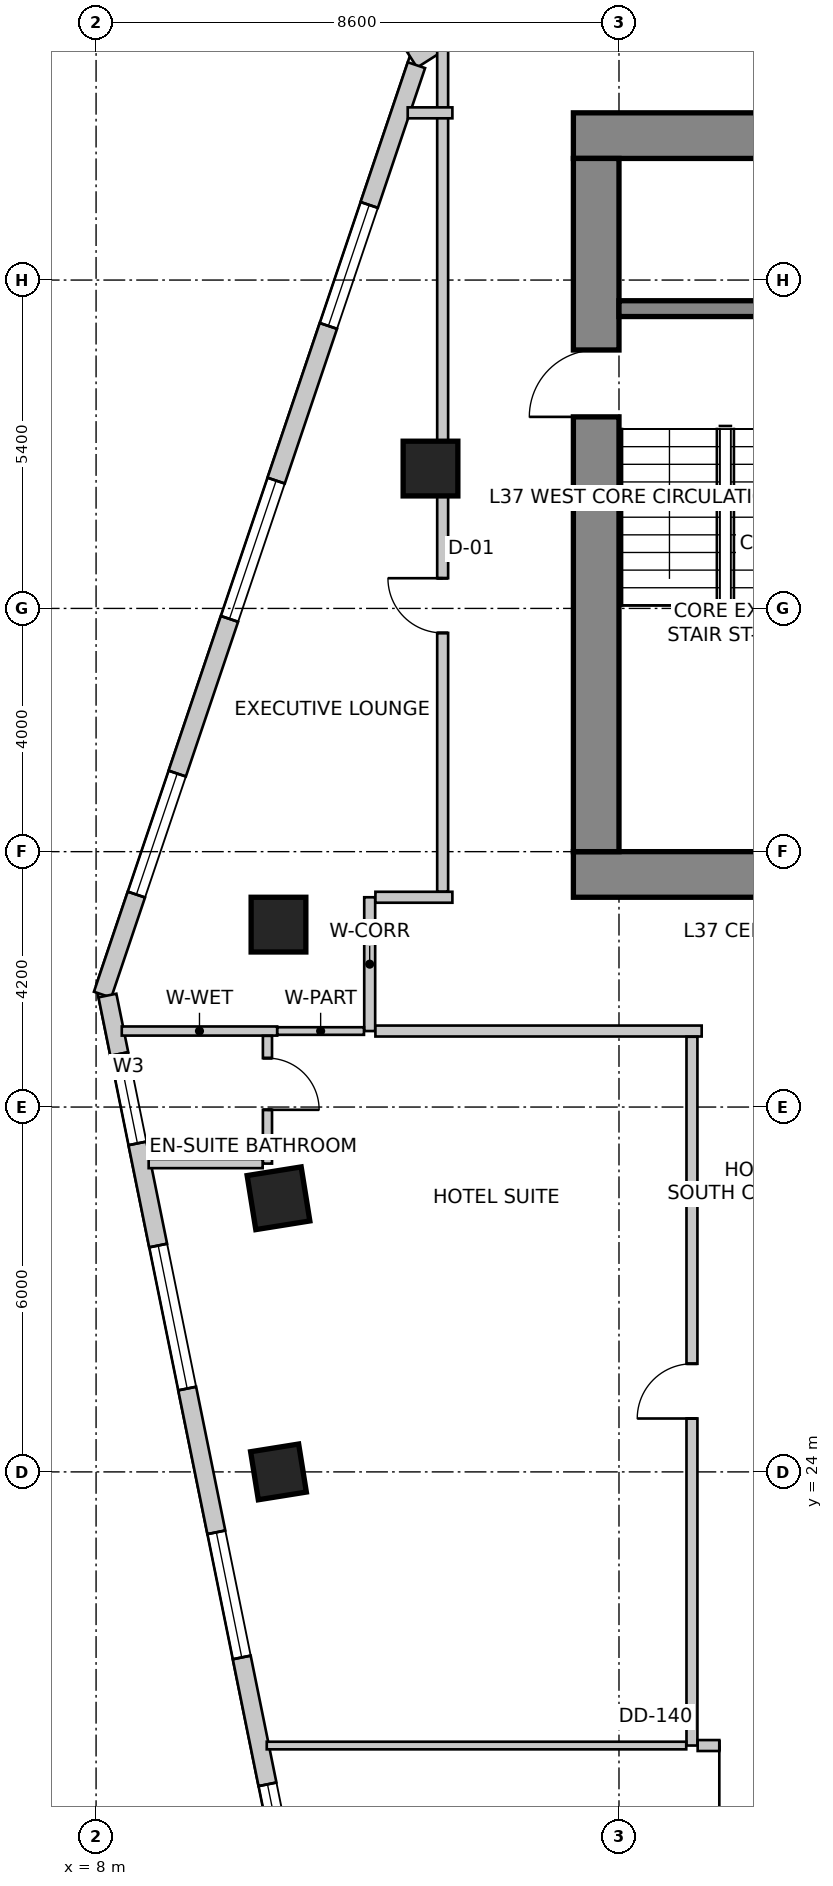
"""IFC4 building model, lengths in metres.
Left out: names, types, materials, properties, quantities, classifications, styles, units other than length and angle.
Written with IfcOpenShell. Run it as: python <this file> out.ifc"""

import sys

from ifc_helpers import new_model, si_unit, direction, frame, frame_2d, origin, origin_2d, place, context, subcontext, project, spatial, rectangle, extrude, source, transform, mapped, element, fill, save


model = new_model("IFC4")
c1 = context("Model", 3, precision=1e-05, world=origin(), true_north=direction((0.0, 1.0)))
c2 = subcontext(c1, "Body", "Model", "MODEL_VIEW")
j1 = project(units=[si_unit("LENGTHUNIT", "METRE"), si_unit("PLANEANGLEUNIT", "RADIAN")], contexts=[c1])
p1 = place(None, origin())
s1 = spatial("IfcSite", under=j1, at=p1, CompositionType="ELEMENT")
p2 = place(p1, origin())
s2 = spatial("IfcBuilding", under=s1, at=p2, CompositionType="ELEMENT")
p3 = place(p2, frame((0.0, 0.0, 150.2)))
s3 = spatial("IfcBuildingStorey", under=s2, at=p3, CompositionType="ELEMENT", Elevation=150.2)
p4 = place(p3, frame((15.85, 45.975, 0.0), z_axis=(0.0, 0.0, 1.0), x_axis=(1.0, 0.0, 0.0)))
e1 = element("IfcWall", 1, at=p4, inside=s3, PredefinedType="SHEAR", context=c2, shape_type="SweptSolid", body=[
    extrude(rectangle(XDim=15.9, YDim=0.75, at=frame_2d((7.95, 0.0))), origin(), (0.0, 0.0, 1.0), 3.6),
])
p5 = place(p3, frame((15.85, 33.825, 0.0), z_axis=(0.0, 0.0, 1.0), x_axis=(1.0, 0.0, 0.0)))
e2 = element("IfcWall", 2, at=p5, inside=s3, PredefinedType="SHEAR", context=c2, shape_type="SweptSolid", body=[
    extrude(rectangle(XDim=15.9, YDim=0.75, at=frame_2d((7.95, 0.0))), origin(), (0.0, 0.0, 1.0), 3.6),
])
m1 = source(origin(), c2, "Body", "SweptSolid", [
    extrude(rectangle(XDim=1.3, YDim=2.15, at=frame_2d((0.65, 1.075))), frame((0.0, 0.385, 0.0), z_axis=(0.0, -1.0, 0.0), x_axis=(1.0, 0.0, 0.0)), (0.0, 0.0, 1.0), 0.77),
])
p6 = place(p5, frame((10.08, 0.0, 0.0)))
e3 = element("IfcOpeningElement", 3, at=p6, cuts=e2, PredefinedType="OPENING", context=c2, shape_type="MappedRepresentation", body=[
    mapped(m1, transform((0.0, 0.0, 0.0), scale=1.0)),
])
p7 = place(p3, frame((16.225, 34.2, 0.0), z_axis=(0.0, 0.0, 1.0), x_axis=(0.0, 1.0, 0.0)))
e4 = element("IfcWall", 4, at=p7, inside=s3, PredefinedType="SHEAR", context=c2, shape_type="SweptSolid", body=[
    extrude(rectangle(XDim=11.4, YDim=0.75, at=frame_2d((5.7, 0.0))), origin(), (0.0, 0.0, 1.0), 3.6),
])
m2 = source(origin(), c2, "Body", "SweptSolid", [
    extrude(rectangle(XDim=1.1, YDim=2.15, at=frame_2d((0.55, 1.075))), frame((0.0, 0.385, 0.0), z_axis=(0.0, -1.0, 0.0), x_axis=(1.0, 0.0, 0.0)), (0.0, 0.0, 1.0), 0.77),
])
p8 = place(p7, frame((7.15, 0.0, 0.0)))
e5 = element("IfcOpeningElement", 5, at=p8, cuts=e4, PredefinedType="OPENING", context=c2, shape_type="MappedRepresentation", body=[
    mapped(m2, transform((0.0, 0.0, 0.0), scale=1.0)),
])
p9 = place(p3, frame((16.6, 43.13, 0.0), z_axis=(0.0, 0.0, 1.0), x_axis=(1.0, 0.0, 0.0)))
e6 = element("IfcWall", 6, at=p9, inside=s3, PredefinedType="SHEAR", context=c2, shape_type="SweptSolid", body=[
    extrude(rectangle(XDim=3.5, YDim=0.26, at=frame_2d((1.75, 0.0))), origin(), (0.0, 0.0, 1.0), 3.6),
])
m3 = source(origin(), c2, "Body", "SweptSolid", [
    extrude(rectangle(XDim=0.9, YDim=0.9, at=origin_2d()), origin(), (0.0, 0.0, 1.0), 3.6),
])
for number, where, z_axis, x_axis in (
    (7, (11.0, 33.0, 0.0), (0.0, 0.0, 1.0), (1.0, 0.0, 0.0)),
    (8, (13.5, 40.5, 0.0), (0.0, 0.0, 1.0), (1.0, 0.0, 0.0)),
    (9, (11.0, 28.5, 0.0), (0.0, 0.0, 1.0), (0.158, -0.987, 0.0)),
):
    element("IfcColumn", number, at=place(p3, frame(where, z_axis=z_axis, x_axis=x_axis)), inside=s3, PredefinedType="COLUMN", context=c2, shape_type="MappedRepresentation", body=[
        mapped(m3, transform((0.0, 0.0, 0.0), scale=1.0)),
    ])
m4 = source(origin(), c2, "Body", "SweptSolid", [
    extrude(rectangle(XDim=0.8, YDim=0.8, at=origin_2d()), origin(), (0.0, 0.0, 1.0), 3.6),
])
p10 = place(p3, frame((11.0, 24.0, 0.0), z_axis=(0.0, 0.0, 1.0), x_axis=(0.158158067254, -0.987413806751, 0.0)))
e10 = element("IfcColumn", 10, at=p10, inside=s3, PredefinedType="COLUMN", context=c2, shape_type="MappedRepresentation", body=[
    mapped(m4, transform((0.0, 0.0, 0.0), scale=1.0)),
])
p11 = place(p3, frame((21.875, 52.742, 0.0), z_axis=(0.0, 0.0, 1.0), x_axis=(-0.843662465249, -0.536873956092, 0.0)))
e11 = element("IfcWall", 11, at=p11, inside=s3, PredefinedType="SOLIDWALL", context=c2, shape_type="SweptSolid", body=[
    extrude(rectangle(XDim=10.284, YDim=0.3, at=frame_2d((5.142, 0.0))), origin(), (0.0, 0.0, 1.0), 3.35),
])
m5 = source(origin(), c2, "Body", "SweptSolid", [
    extrude(rectangle(XDim=2.4, YDim=2.2, at=frame_2d((1.2, 1.1))), frame((0.0, 0.16, 0.0), z_axis=(0.0, -1.0, 0.0), x_axis=(1.0, 0.0, 0.0)), (0.0, 0.0, 1.0), 0.32),
])
p12 = place(p11, frame((2.656, 0.0, 0.85)))
e12 = element("IfcOpeningElement", 12, at=p12, cuts=e11, PredefinedType="OPENING", context=c2, shape_type="MappedRepresentation", body=[
    mapped(m5, transform((0.0, 0.0, 0.0), scale=1.0)),
])
m6 = source(origin(), c2, "Body", "SweptSolid", [
    extrude(rectangle(XDim=1.5, YDim=1.8, at=frame_2d((0.75, 0.9))), frame((0.0, 0.16, 0.0), z_axis=(0.0, -1.0, 0.0), x_axis=(1.0, 0.0, 0.0)), (0.0, 0.0, 1.0), 0.32),
])
p13 = place(p11, frame((7.937, 0.0, 0.85)))
e13 = element("IfcOpeningElement", 13, at=p13, cuts=e11, PredefinedType="OPENING", context=c2, shape_type="MappedRepresentation", body=[
    mapped(m6, transform((0.0, 0.0, 0.0), scale=1.0)),
])
p14 = place(p3, frame((13.269, 47.134, 0.0), z_axis=(0.0, 0.0, 1.0), x_axis=(-0.319929773322, -0.947441259468, 0.0)))
e14 = element("IfcWall", 14, at=p14, inside=s3, PredefinedType="SOLIDWALL", context=c2, shape_type="SweptSolid", body=[
    extrude(rectangle(XDim=16.134, YDim=0.3, at=frame_2d((8.067, 0.0))), origin(), (0.0, 0.0, 1.0), 3.35),
])
m7 = source(origin(), c2, "Body", "SweptSolid", [
    extrude(rectangle(XDim=2.1, YDim=2.0, at=frame_2d((1.05, 1.0))), frame((0.0, 0.16, 0.0), z_axis=(0.0, -1.0, 0.0), x_axis=(1.0, 0.0, 0.0)), (0.0, 0.0, 1.0), 0.32),
])
p15 = place(p14, frame((2.426, 0.0, 0.85)))
e15 = element("IfcOpeningElement", 15, at=p15, cuts=e14, PredefinedType="OPENING", context=c2, shape_type="MappedRepresentation", body=[
    mapped(m7, transform((0.0, 0.0, 0.0), scale=1.0)),
])
p16 = place(p14, frame((7.211, 0.0, 0.85)))
e16 = element("IfcOpeningElement", 16, at=p16, cuts=e14, PredefinedType="OPENING", context=c2, shape_type="MappedRepresentation", body=[
    mapped(m5, transform((0.0, 0.0, 0.0), scale=1.0)),
])
p17 = place(p14, frame((12.296, 0.0, 0.85)))
e17 = element("IfcOpeningElement", 17, at=p17, cuts=e14, PredefinedType="OPENING", context=c2, shape_type="MappedRepresentation", body=[
    mapped(m7, transform((0.0, 0.0, 0.0), scale=1.0)),
])
p18 = place(p3, frame((8.187, 31.834, 0.0), z_axis=(0.0, 0.0, 1.0), x_axis=(0.198869838988, -0.980025911464, 0.0)))
e18 = element("IfcWall", 18, at=p18, inside=s3, PredefinedType="SOLIDWALL", context=c2, shape_type="SweptSolid", body=[
    extrude(rectangle(XDim=16.363, YDim=0.3, at=frame_2d((8.182, 0.0))), origin(), (0.0, 0.0, 1.0), 3.35),
])
p19 = place(p18, frame((0.981, 0.0, 0.85)))
e19 = element("IfcOpeningElement", 19, at=p19, cuts=e18, PredefinedType="OPENING", context=c2, shape_type="MappedRepresentation", body=[
    mapped(m6, transform((0.0, 0.0, 0.0), scale=1.0)),
])
p20 = place(p18, frame((4.195, 0.0, 0.85)))
e20 = element("IfcOpeningElement", 20, at=p20, cuts=e18, PredefinedType="OPENING", context=c2, shape_type="MappedRepresentation", body=[
    mapped(m5, transform((0.0, 0.0, 0.0), scale=1.0)),
])
p21 = place(p18, frame((9.007, 0.0, 0.85)))
e21 = element("IfcOpeningElement", 21, at=p21, cuts=e18, PredefinedType="OPENING", context=c2, shape_type="MappedRepresentation", body=[
    mapped(m7, transform((0.0, 0.0, 0.0), scale=1.0)),
])
p22 = place(p18, frame((13.236, 0.0, 0.85)))
e22 = element("IfcOpeningElement", 22, at=p22, cuts=e18, PredefinedType="OPENING", context=c2, shape_type="MappedRepresentation", body=[
    mapped(m5, transform((0.0, 0.0, 0.0), scale=1.0)),
])
p23 = place(p3, frame((12.5, 31.25, 0.0), z_axis=(0.0, 0.0, 1.0), x_axis=(0.0, 1.0, 0.0)))
e23 = element("IfcWall", 23, at=p23, inside=s3, PredefinedType="PARTITIONING", context=c2, shape_type="SweptSolid", body=[
    extrude(rectangle(XDim=2.2, YDim=0.18, at=frame_2d((1.1, 0.0))), origin(), (0.0, 0.0, 1.0), 3.019),
])
p24 = place(p3, frame((12.594, 33.45, 0.0), z_axis=(0.0, 0.0, 1.0), x_axis=(1.0, 0.0, 0.0)))
e24 = element("IfcWall", 24, at=p24, inside=s3, PredefinedType="PARTITIONING", context=c2, shape_type="SweptSolid", body=[
    extrude(rectangle(XDim=1.266, YDim=0.18, at=frame_2d((0.633, 0.0))), origin(), (0.0, 0.0, 1.0), 3.35),
])
p25 = place(p3, frame((17.96, 31.25, 0.0), z_axis=(0.0, 0.0, 1.0), x_axis=(-1.0, 0.0, 0.0)))
e25 = element("IfcWall", 25, at=p25, inside=s3, PredefinedType="PARTITIONING", context=c2, shape_type="SweptSolid", body=[
    extrude(rectangle(XDim=5.366, YDim=0.18, at=frame_2d((2.683, 0.0))), origin(), (0.0, 0.0, 1.0), 3.019),
])
p26 = place(p3, frame((13.7, 33.544, 0.0), z_axis=(0.0, 0.0, 1.0), x_axis=(0.0, 1.0, 0.0)))
e26 = element("IfcWall", 26, at=p26, inside=s3, PredefinedType="PARTITIONING", context=c2, shape_type="SweptSolid", body=[
    extrude(rectangle(XDim=13.86, YDim=0.18, at=frame_2d((6.93, 0.0))), origin(), (0.0, 0.0, 1.0), 2.492),
])
m8 = source(origin(), c2, "Body", "SweptSolid", [
    extrude(rectangle(XDim=0.9, YDim=2.15, at=frame_2d((0.45, 1.075))), frame((0.0, 0.1, 0.0), z_axis=(0.0, -1.0, 0.0), x_axis=(1.0, 0.0, 0.0)), (0.0, 0.0, 1.0), 0.2),
])
p27 = place(p26, frame((4.253, 0.0, 0.0)))
e27 = element("IfcOpeningElement", 27, at=p27, cuts=e26, PredefinedType="OPENING", context=c2, shape_type="MappedRepresentation", body=[
    mapped(m8, transform((0.0, 0.0, 0.0), scale=1.0)),
])
p28 = place(p3, frame((13.86, 46.35, 0.0), z_axis=(0.0, 0.0, 1.0), x_axis=(-1.0, 0.0, 0.0)))
e28 = element("IfcWall", 28, at=p28, inside=s3, PredefinedType="PARTITIONING", context=c2, shape_type="SweptSolid", body=[
    extrude(rectangle(XDim=0.735, YDim=0.18, at=frame_2d((0.367, 0.0))), origin(), (0.0, 0.0, 1.0), 3.35),
])
p29 = place(p3, frame((10.979, 31.25, 0.0), z_axis=(0.0, 0.0, 1.0), x_axis=(-1.0, 0.0, 0.0)))
e29 = element("IfcWall", 29, at=p29, inside=s3, PredefinedType="PARTITIONING", context=c2, shape_type="SweptSolid", body=[
    extrude(rectangle(XDim=2.556, YDim=0.15, at=frame_2d((1.278, 0.0))), origin(), (0.0, 0.0, 1.0), 2.492),
])
p30 = place(p3, frame((12.406, 31.25, 0.0), z_axis=(0.0, 0.0, 1.0), x_axis=(-1.0, 0.0, 0.0)))
e30 = element("IfcWall", 30, at=p30, inside=s3, PredefinedType="PARTITIONING", context=c2, shape_type="SweptSolid", body=[
    extrude(rectangle(XDim=1.426, YDim=0.125, at=frame_2d((0.713, 0.0))), origin(), (0.0, 0.0, 1.0), 2.492),
])
p31 = place(p3, frame((17.8, 19.5, 0.0), z_axis=(0.0, 0.0, 1.0), x_axis=(0.0, 1.0, 0.0)))
e31 = element("IfcWall", 31, at=p31, inside=s3, PredefinedType="PARTITIONING", context=c2, shape_type="SweptSolid", body=[
    extrude(rectangle(XDim=11.656, YDim=0.18, at=frame_2d((5.828, 0.0))), origin(), (0.0, 0.0, 1.0), 2.803),
])
p32 = place(p31, frame((5.378, 0.0, 0.0)))
e32 = element("IfcOpeningElement", 32, at=p32, cuts=e31, PredefinedType="OPENING", context=c2, shape_type="MappedRepresentation", body=[
    mapped(m8, transform((0.0, 0.0, 0.0), scale=1.0)),
])
p33 = place(p3, frame((20.006, 19.5, 0.0), z_axis=(0.0, 0.0, 1.0), x_axis=(-1.0, 0.0, 0.0)))
e33 = element("IfcWall", 33, at=p33, inside=s3, PredefinedType="PARTITIONING", context=c2, shape_type="SweptSolid", body=[
    extrude(rectangle(XDim=2.112, YDim=0.18, at=frame_2d((1.056, 0.0))), origin(), (0.0, 0.0, 1.0), 3.35),
])
m9 = source(origin(), c2, "Body", "SweptSolid", [
    extrude(rectangle(XDim=1.4, YDim=2.15, at=frame_2d((0.7, 1.075))), frame((0.0, 0.1, 0.0), z_axis=(0.0, -1.0, 0.0), x_axis=(1.0, 0.0, 0.0)), (0.0, 0.0, 1.0), 0.2),
])
p34 = place(p33, frame((0.356, 0.0, 0.0)))
e34 = element("IfcOpeningElement", 34, at=p34, cuts=e33, PredefinedType="OPENING", context=c2, shape_type="MappedRepresentation", body=[
    mapped(m9, transform((0.0, 0.0, 0.0), scale=1.0)),
])
p35 = place(p3, frame((10.819, 31.171, 0.0), z_axis=(0.0, 0.0, 1.0), x_axis=(0.0, -1.0, 0.0)))
e35 = element("IfcWall", 35, at=p35, inside=s3, PredefinedType="PARTITIONING", context=c2, shape_type="SweptSolid", body=[
    extrude(rectangle(XDim=2.101, YDim=0.15, at=frame_2d((1.05, 0.0))), origin(), (0.0, 0.0, 1.0), 2.492),
])
m10 = source(origin(), c2, "Body", "SweptSolid", [
    extrude(rectangle(XDim=0.85, YDim=2.15, at=frame_2d((0.425, 1.075))), frame((0.0, 0.085, 0.0), z_axis=(0.0, -1.0, 0.0), x_axis=(1.0, 0.0, 0.0)), (0.0, 0.0, 1.0), 0.17),
])
p36 = place(p35, frame((0.366, 0.0, 0.0)))
e36 = element("IfcOpeningElement", 36, at=p36, cuts=e35, PredefinedType="OPENING", context=c2, shape_type="MappedRepresentation", body=[
    mapped(m10, transform((0.0, 0.0, 0.0), scale=1.0)),
])
p37 = place(p3, frame((10.74, 29.07, 0.0), z_axis=(0.0, 0.0, 1.0), x_axis=(-1.0, 0.0, 0.0)))
e37 = element("IfcWall", 37, at=p37, inside=s3, PredefinedType="PARTITIONING", context=c2, shape_type="SweptSolid", body=[
    extrude(rectangle(XDim=1.875, YDim=0.15, at=frame_2d((0.937, 0.0))), origin(), (0.0, 0.0, 1.0), 3.35),
])
p38 = place(p3, frame((17.706, 19.5, 0.0), z_axis=(0.0, 0.0, 1.0), x_axis=(-1.0, 0.0, 0.0)))
e38 = element("IfcWall", 38, at=p38, inside=s3, PredefinedType="PARTITIONING", context=c2, shape_type="SweptSolid", body=[
    extrude(rectangle(XDim=6.899, YDim=0.125, at=frame_2d((3.45, 0.0))), origin(), (0.0, 0.0, 1.0), 3.35),
])
m11 = source(origin(), c2, "Body", "SweptSolid", [
    extrude(rectangle(XDim=2.1, YDim=2.0, at=frame_2d((1.05, 1.0))), frame((0.0, -0.015, 0.0), z_axis=(0.0, -1.0, 0.0), x_axis=(1.0, 0.0, 0.0)), (0.0, 0.0, 1.0), 0.06),
])
p39 = place(p15, origin())
e39 = element("IfcWindow", 39, at=p39, inside=s3, PartitioningType="SINGLE_PANEL", PredefinedType="WINDOW", context=c2, shape_type="MappedRepresentation", body=[
    mapped(m11, transform((0.0, 0.0, 0.0), scale=1.0)),
])
fill(e15, e39)
m12 = source(origin(), c2, "Body", "SweptSolid", [
    extrude(rectangle(XDim=2.4, YDim=2.2, at=frame_2d((1.2, 1.1))), frame((0.0, -0.015, 0.0), z_axis=(0.0, -1.0, 0.0), x_axis=(1.0, 0.0, 0.0)), (0.0, 0.0, 1.0), 0.06),
])
p40 = place(p16, origin())
e40 = element("IfcWindow", 40, at=p40, inside=s3, PartitioningType="SINGLE_PANEL", PredefinedType="WINDOW", context=c2, shape_type="MappedRepresentation", body=[
    mapped(m12, transform((0.0, 0.0, 0.0), scale=1.0)),
])
fill(e16, e40)
p41 = place(p17, origin())
e41 = element("IfcWindow", 41, at=p41, inside=s3, PartitioningType="SINGLE_PANEL", PredefinedType="WINDOW", context=c2, shape_type="MappedRepresentation", body=[
    mapped(m11, transform((0.0, 0.0, 0.0), scale=1.0)),
])
fill(e17, e41)
m13 = source(origin(), c2, "Body", "SweptSolid", [
    extrude(rectangle(XDim=1.5, YDim=1.8, at=frame_2d((0.75, 0.9))), frame((0.0, -0.015, 0.0), z_axis=(0.0, -1.0, 0.0), x_axis=(1.0, 0.0, 0.0)), (0.0, 0.0, 1.0), 0.06),
])
p42 = place(p19, origin())
e42 = element("IfcWindow", 42, at=p42, inside=s3, PartitioningType="SINGLE_PANEL", PredefinedType="WINDOW", context=c2, shape_type="MappedRepresentation", body=[
    mapped(m13, transform((0.0, 0.0, 0.0), scale=1.0)),
])
fill(e19, e42)
p43 = place(p20, origin())
e43 = element("IfcWindow", 43, at=p43, inside=s3, PartitioningType="SINGLE_PANEL", PredefinedType="WINDOW", context=c2, shape_type="MappedRepresentation", body=[
    mapped(m12, transform((0.0, 0.0, 0.0), scale=1.0)),
])
fill(e20, e43)
p44 = place(p21, origin())
e44 = element("IfcWindow", 44, at=p44, inside=s3, PartitioningType="SINGLE_PANEL", PredefinedType="WINDOW", context=c2, shape_type="MappedRepresentation", body=[
    mapped(m11, transform((0.0, 0.0, 0.0), scale=1.0)),
])
fill(e21, e44)
p45 = place(p22, origin())
e45 = element("IfcWindow", 45, at=p45, inside=s3, PartitioningType="SINGLE_PANEL", PredefinedType="WINDOW", context=c2, shape_type="MappedRepresentation", body=[
    mapped(m12, transform((0.0, 0.0, 0.0), scale=1.0)),
])
fill(e22, e45)
m14 = source(origin(), c2, "Body", "SweptSolid", [
    extrude(rectangle(XDim=1.1, YDim=2.15, at=frame_2d((0.55, 1.075))), frame((0.0, 0.025, 0.0), z_axis=(0.0, -1.0, 0.0), x_axis=(1.0, 0.0, 0.0)), (0.0, 0.0, 1.0), 0.05),
])
p46 = place(p8, origin())
e46 = element("IfcDoor", 46, at=p46, inside=s3, OperationType="SINGLE_SWING_LEFT", PredefinedType="DOOR", context=c2, shape_type="MappedRepresentation", body=[
    mapped(m14, transform((0.0, 0.0, 0.0), scale=1.0)),
])
fill(e5, e46)
m15 = source(origin(), c2, "Body", "SweptSolid", [
    extrude(rectangle(XDim=0.9, YDim=2.15, at=frame_2d((0.45, 1.075))), frame((0.0, 0.025, 0.0), z_axis=(0.0, -1.0, 0.0), x_axis=(1.0, 0.0, 0.0)), (0.0, 0.0, 1.0), 0.05),
])
p47 = place(p27, origin())
e47 = element("IfcDoor", 47, at=p47, inside=s3, OperationType="SINGLE_SWING_RIGHT", PredefinedType="DOOR", context=c2, shape_type="MappedRepresentation", body=[
    mapped(m15, transform((0.0, 0.0, 0.0), scale=1.0)),
])
fill(e27, e47)
m16 = source(origin(), c2, "Body", "SweptSolid", [
    extrude(rectangle(XDim=0.85, YDim=2.15, at=frame_2d((0.425, 1.075))), frame((0.0, 0.025, 0.0), z_axis=(0.0, -1.0, 0.0), x_axis=(1.0, 0.0, 0.0)), (0.0, 0.0, 1.0), 0.05),
])
p48 = place(p36, origin())
e48 = element("IfcDoor", 48, at=p48, inside=s3, OperationType="SINGLE_SWING_RIGHT", PredefinedType="DOOR", context=c2, shape_type="MappedRepresentation", body=[
    mapped(m16, transform((0.0, 0.0, 0.0), scale=1.0)),
])
fill(e36, e48)
m17 = source(origin(), c2, "Body", "SweptSolid", [
    extrude(rectangle(XDim=0.9, YDim=2.15, at=frame_2d((0.45, 1.075))), frame((0.0, 0.025, 0.0), z_axis=(0.0, -1.0, 0.0), x_axis=(1.0, 0.0, 0.0)), (0.0, 0.0, 1.0), 0.05),
])
p49 = place(p32, origin())
e49 = element("IfcDoor", 49, at=p49, inside=s3, OperationType="SINGLE_SWING_LEFT", PredefinedType="DOOR", context=c2, shape_type="MappedRepresentation", body=[
    mapped(m17, transform((0.0, 0.0, 0.0), scale=1.0)),
])
fill(e32, e49)
m18 = source(origin(), c2, "Body", "SweptSolid", [
    extrude(rectangle(XDim=1.4, YDim=2.15, at=frame_2d((0.7, 1.075))), frame((0.0, 0.025, 0.0), z_axis=(0.0, -1.0, 0.0), x_axis=(1.0, 0.0, 0.0)), (0.0, 0.0, 1.0), 0.05),
])
p50 = place(p34, origin())
e50 = element("IfcDoor", 50, at=p50, inside=s3, OperationType="SINGLE_SWING_RIGHT", PredefinedType="DOOR", context=c2, shape_type="MappedRepresentation", body=[
    mapped(m18, transform((0.0, 0.0, 0.0), scale=1.0)),
])
fill(e34, e50)
save(model, sys.argv[1])
